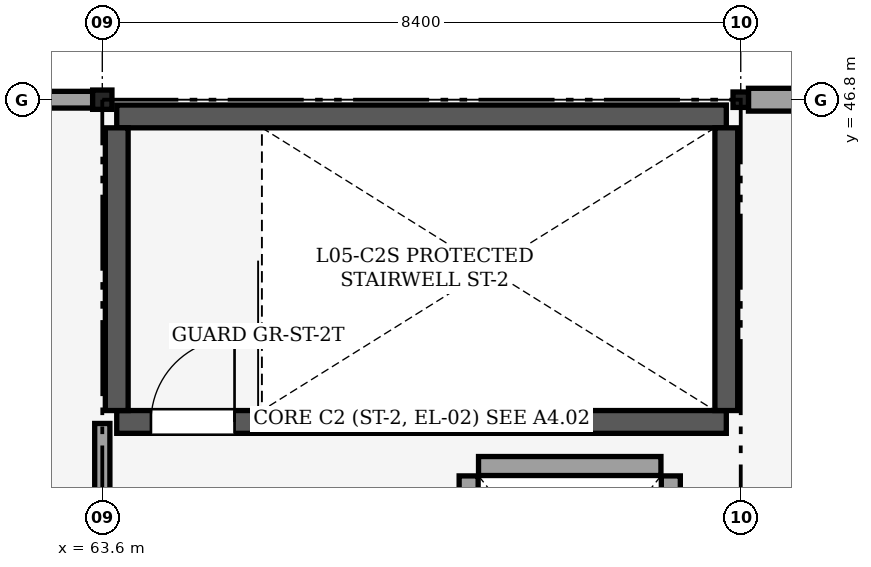
"""IFC4 building model, lengths in metres.
Left out: names, types, materials, properties, quantities, classifications, styles, units other than length and angle.
Written with IfcOpenShell. Run it as: python <this file> out.ifc"""

import sys

from ifc_helpers import new_model, si_unit, direction, frame, frame_2d, origin, origin_2d, place, context, subcontext, project, spatial, rectangle, hollow_rectangle, extrude, element, fill, save


model = new_model("IFC4")
c1 = context("Model", 3, precision=1e-05, world=origin(), true_north=direction((0.0, 1.0)))
c2 = subcontext(c1, "Body", "Model", "MODEL_VIEW")
j1 = project(units=[si_unit("LENGTHUNIT", "METRE"), si_unit("PLANEANGLEUNIT", "RADIAN")], contexts=[c1])
p1 = place(None, origin())
s1 = spatial("IfcSite", under=j1, at=p1, CompositionType="ELEMENT")
p2 = place(p1, origin())
s2 = spatial("IfcBuilding", under=s1, at=p2, CompositionType="ELEMENT")
p3 = place(p2, frame((0.0, 0.0, 24.6)))
s3 = spatial("IfcBuildingStorey", under=s2, at=p3, CompositionType="ELEMENT", Elevation=24.6)
p4 = place(p3, frame((63.6, 46.8, 0.0), z_axis=(0.0, 0.0, 1.0), x_axis=(1.0, 0.0, 0.0)))
e1 = element("IfcColumn", 1, at=p4, inside=s3, PredefinedType="COLUMN", context=c2, shape_type="SweptSolid", body=[
    extrude(hollow_rectangle(XDim=0.254, YDim=0.254, WallThickness=0.013, OuterFilletRadius=0.025, at=origin_2d()), origin(), (0.0, 0.0, 1.0), 4.8),
])
p5 = place(p3, frame((72.0, 46.8, 0.0), z_axis=(0.0, 0.0, 1.0), x_axis=(1.0, 0.0, 0.0)))
e2 = element("IfcColumn", 2, at=p5, inside=s3, PredefinedType="COLUMN", context=c2, shape_type="SweptSolid", body=[
    extrude(hollow_rectangle(XDim=0.203, YDim=0.203, WallThickness=0.013, OuterFilletRadius=0.025, at=origin_2d()), origin(), (0.0, 0.0, 1.0), 4.8),
])
p6 = place(p3, frame((55.302, 46.8, 0.0), z_axis=(0.0, 0.0, 1.0), x_axis=(1.0, 0.0, 0.0)))
e3 = element("IfcWall", 3, at=p6, inside=s3, PredefinedType="SOLIDWALL", context=c2, shape_type="SweptSolid", body=[
    extrude(rectangle(XDim=8.171, YDim=0.22, at=frame_2d((4.086, 0.0))), origin(), (0.0, 0.0, 1.0), 3.842),
])
p7 = place(p6, frame((2.586, 0.0, 0.85)))
e4 = element("IfcOpeningElement", 4, at=p7, cuts=e3, PredefinedType="OPENING", context=c2, shape_type="SweptSolid", body=[
    extrude(rectangle(XDim=3.0, YDim=1.9, at=frame_2d((1.5, 0.95))), frame((0.0, 0.12, 0.0), z_axis=(0.0, -1.0, 0.0), x_axis=(1.0, 0.0, 0.0)), (0.0, 0.0, 1.0), 0.24),
])
p8 = place(p3, frame((72.102, 46.8, 0.0), z_axis=(0.0, 0.0, 1.0), x_axis=(1.0, 0.0, 0.0)))
e5 = element("IfcWall", 5, at=p8, inside=s3, PredefinedType="SOLIDWALL", context=c2, shape_type="SweptSolid", body=[
    extrude(rectangle(XDim=8.146, YDim=0.3, at=frame_2d((4.073, 0.0))), origin(), (0.0, 0.0, 1.0), 3.842),
])
p9 = place(p8, frame((3.473, 0.0, 0.9)))
e6 = element("IfcOpeningElement", 6, at=p9, cuts=e5, PredefinedType="OPENING", context=c2, shape_type="SweptSolid", body=[
    extrude(rectangle(XDim=1.2, YDim=1.5, at=frame_2d((0.6, 0.75))), frame((0.0, 0.16, 0.0), z_axis=(0.0, -1.0, 0.0), x_axis=(1.0, 0.0, 0.0)), (0.0, 0.0, 1.0), 0.321),
])
p10 = place(p3, frame((63.79, 42.56, 0.0), z_axis=(0.0, 0.0, 1.0), x_axis=(1.0, 0.0, 0.0)))
e7 = element("IfcWall", 7, at=p10, inside=s3, PredefinedType="SHEAR", context=c2, shape_type="SweptSolid", body=[
    extrude(rectangle(XDim=8.02, YDim=0.3, at=frame_2d((4.01, 0.0))), origin(), (0.0, 0.0, 1.0), 4.6),
])
p11 = place(p10, frame((0.45, 0.0, 0.0)))
e8 = element("IfcOpeningElement", 8, at=p11, cuts=e7, PredefinedType="OPENING", context=c2, shape_type="SweptSolid", body=[
    extrude(rectangle(XDim=1.1, YDim=2.15, at=frame_2d((0.55, 1.075))), frame((0.0, 0.16, 0.0), z_axis=(0.0, -1.0, 0.0), x_axis=(1.0, 0.0, 0.0)), (0.0, 0.0, 1.0), 0.321),
])
p12 = place(p3, frame((63.79, 46.58, 0.0), z_axis=(0.0, 0.0, 1.0), x_axis=(1.0, 0.0, 0.0)))
e9 = element("IfcWall", 9, at=p12, inside=s3, PredefinedType="SHEAR", context=c2, shape_type="SweptSolid", body=[
    extrude(rectangle(XDim=8.02, YDim=0.3, at=frame_2d((4.01, 0.0))), origin(), (0.0, 0.0, 1.0), 4.6),
])
for number, where, z_axis, x_axis in (
    (10, (63.79, 42.71, 0.0), (0.0, 0.0, 1.0), (0.0, 1.0, 0.0)),
    (11, (71.81, 42.71, 0.0), (0.0, 0.0, 1.0), (0.0, 1.0, 0.0)),
):
    element("IfcWall", number, at=place(p3, frame(where, z_axis=z_axis, x_axis=x_axis)), inside=s3, PredefinedType="SHEAR", context=c2, shape_type="SweptSolid", body=[
        extrude(rectangle(XDim=3.72, YDim=0.3, at=frame_2d((1.86, 0.0))), origin(), (0.0, 0.0, 1.0), 4.6),
    ])
p13 = place(p3, frame((71.08, 38.85, 0.0), z_axis=(0.0, 0.0, 1.0), x_axis=(0.0, 1.0, 0.0)))
e12 = element("IfcWall", 12, at=p13, inside=s3, PredefinedType="PARTITIONING", context=c2, shape_type="SweptSolid", body=[
    extrude(rectangle(XDim=3.0, YDim=0.25, at=frame_2d((1.5, 0.0))), origin(), (0.0, 0.0, 1.0), 4.6),
])
p14 = place(p3, frame((68.55, 41.98, 0.0), z_axis=(0.0, 0.0, 1.0), x_axis=(1.0, 0.0, 0.0)))
e13 = element("IfcWall", 13, at=p14, inside=s3, PredefinedType="PARTITIONING", context=c2, shape_type="SweptSolid", body=[
    extrude(rectangle(XDim=2.4, YDim=0.25, at=frame_2d((1.2, 0.0))), origin(), (0.0, 0.0, 1.0), 4.6),
])
p15 = place(p3, frame((68.42, 38.5, 0.0), z_axis=(0.0, 0.0, 1.0), x_axis=(0.0, 1.0, 0.0)))
e14 = element("IfcWall", 14, at=p15, inside=s3, PredefinedType="PARTITIONING", context=c2, shape_type="SweptSolid", body=[
    extrude(rectangle(XDim=3.35, YDim=0.25, at=frame_2d((1.675, 0.0))), origin(), (0.0, 0.0, 1.0), 4.6),
])
p16 = place(p15, frame((0.85, 0.0, 0.0)))
e15 = element("IfcOpeningElement", 15, at=p16, cuts=e14, PredefinedType="OPENING", context=c2, shape_type="SweptSolid", body=[
    extrude(rectangle(XDim=1.25, YDim=2.15, at=frame_2d((0.625, 1.075))), frame((0.0, 0.135, 0.0), z_axis=(0.0, -1.0, 0.0), x_axis=(1.0, 0.0, 0.0)), (0.0, 0.0, 1.0), 0.271),
])
p17 = place(p3, frame((63.6, 38.62, 0.0), z_axis=(0.0, 0.0, 1.0), x_axis=(0.0, 1.0, 0.0)))
e16 = element("IfcWall", 16, at=p17, inside=s3, PredefinedType="PARTITIONING", context=c2, shape_type="SweptSolid", body=[
    extrude(rectangle(XDim=3.92, YDim=0.2, at=frame_2d((1.96, 0.0))), origin(), (0.0, 0.0, 1.0), 3.524),
])
p18 = place(p11, origin())
e17 = element("IfcDoor", 17, at=p18, inside=s3, OperationType="SINGLE_SWING_RIGHT", PredefinedType="DOOR", context=c2, shape_type="SweptSolid", body=[
    extrude(rectangle(XDim=1.1, YDim=2.15, at=frame_2d((0.55, 1.075))), frame((0.0, 0.025, 0.0), z_axis=(0.0, -1.0, 0.0), x_axis=(1.0, 0.0, 0.0)), (0.0, 0.0, 1.0), 0.05),
])
fill(e8, e17)
save(model, sys.argv[1])
